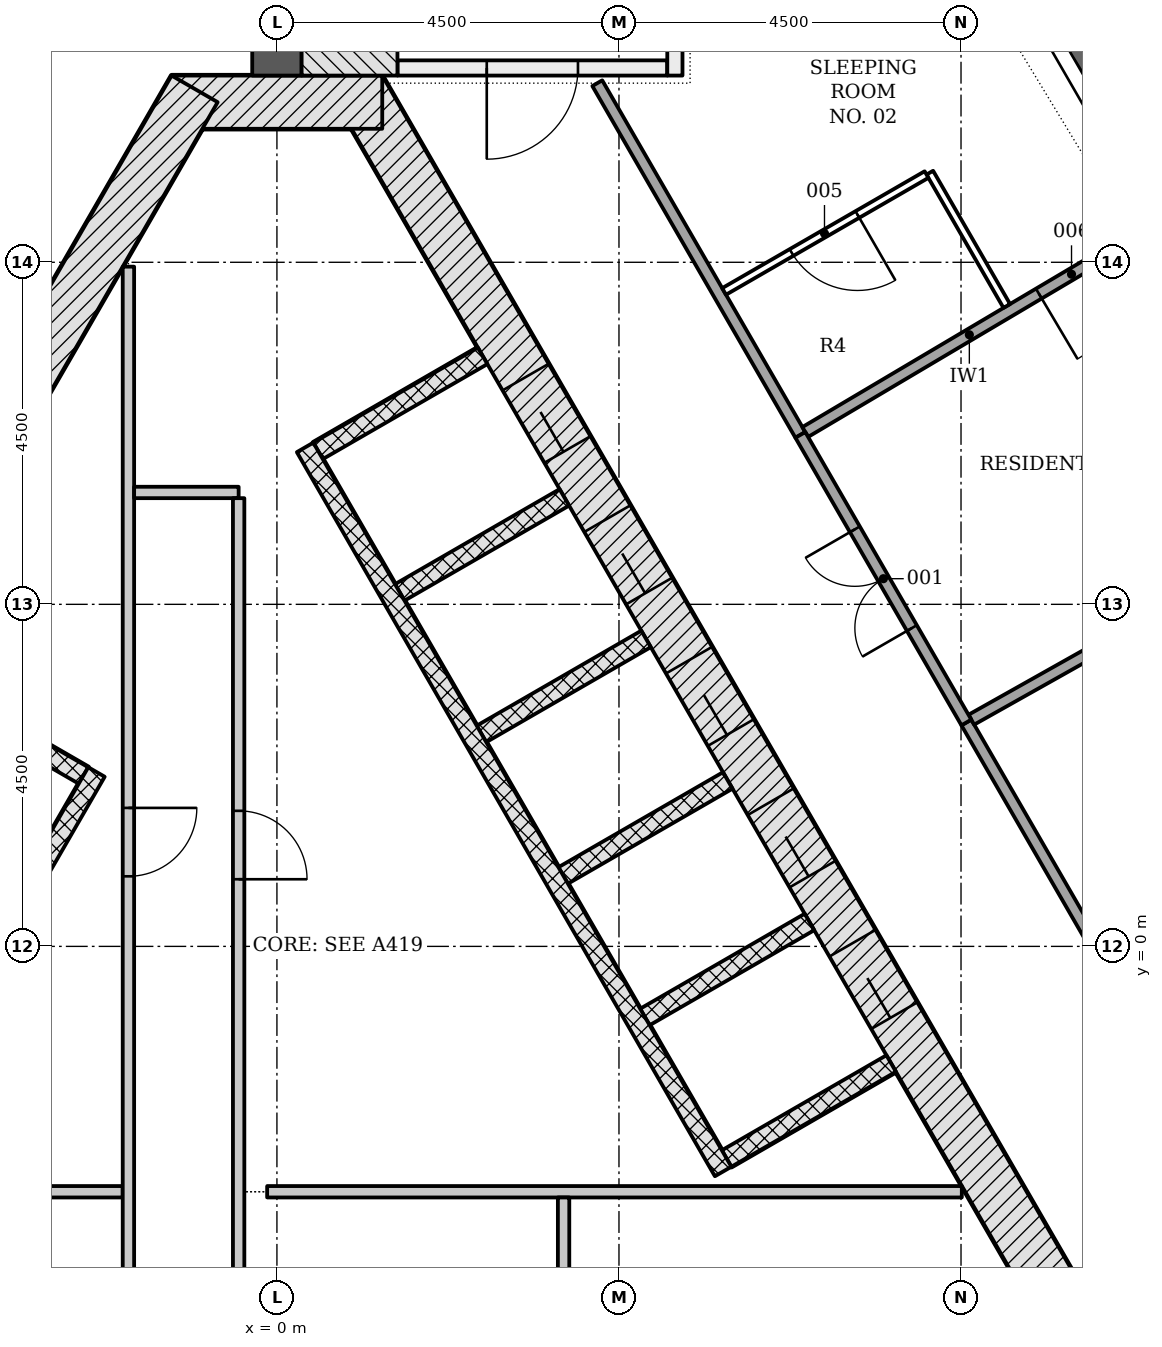
"""IFC4 building model, lengths in metres.
Left out: names, types, materials, properties, quantities, classifications, styles, units other than length and angle.
Written with IfcOpenShell. Run it as: python <this file> out.ifc"""

import sys

from ifc_helpers import new_model, si_unit, direction, frame, frame_2d, origin, place, context, subcontext, project, spatial, rectangle, extrude, element, fill, save


model = new_model("IFC4")
c1 = context("Model", 3, precision=1e-05, world=origin(), true_north=direction((0.0, 1.0)))
c2 = subcontext(c1, "Body", "Model", "MODEL_VIEW")
j1 = project(units=[si_unit("LENGTHUNIT", "METRE"), si_unit("PLANEANGLEUNIT", "RADIAN")], contexts=[c1])
p1 = place(None, origin())
s1 = spatial("IfcSite", under=j1, at=p1, CompositionType="ELEMENT")
p2 = place(p1, origin())
s2 = spatial("IfcBuilding", under=s1, at=p2, CompositionType="ELEMENT")
p3 = place(p2, frame((0.0, 0.0, 232.8)))
s3 = spatial("IfcBuildingStorey", under=s2, at=p3, CompositionType="ELEMENT", Elevation=232.8)
p4 = place(p3, frame((8.926, -6.753, -0.2), z_axis=(0.0, 0.0, 1.0), x_axis=(0.500042739161, 0.866000726912, 0.0)))
e1 = element("IfcWall", 1, at=p4, inside=s3, PredefinedType="SHEAR", context=c2, shape_type="SweptSolid", body=[
    extrude(rectangle(XDim=2.771, YDim=0.7, at=frame_2d((1.386, 0.0))), origin(), (0.0, 0.0, 1.0), 3.6),
])
p5 = place(p3, frame((10.311, -4.703, -0.2), z_axis=(0.0, 0.0, 1.0), x_axis=(-0.500001446645, 0.866024568562, 0.0)))
e2 = element("IfcWall", 2, at=p5, inside=s3, PredefinedType="SHEAR", context=c2, shape_type="SweptSolid", body=[
    extrude(rectangle(XDim=18.458, YDim=0.7, at=frame_2d((9.229, 0.0))), origin(), (0.0, 0.0, 1.0), 3.6),
])
p6 = place(p5, frame((4.379, 0.0, 0.2)))
e3 = element("IfcOpeningElement", 3, at=p6, cuts=e2, PredefinedType="OPENING", context=c2, shape_type="SweptSolid", body=[
    extrude(rectangle(XDim=1.1, YDim=2.1, at=frame_2d((0.55, 1.05))), frame((0.0, 0.36, 0.0), z_axis=(0.0, -1.0, 0.0), x_axis=(1.0, 0.0, 0.0)), (0.0, 0.0, 1.0), 0.72),
])
p7 = place(p5, frame((6.529, 0.0, 0.2)))
e4 = element("IfcOpeningElement", 4, at=p7, cuts=e2, PredefinedType="OPENING", context=c2, shape_type="SweptSolid", body=[
    extrude(rectangle(XDim=1.1, YDim=2.1, at=frame_2d((0.55, 1.05))), frame((0.0, 0.36, 0.0), z_axis=(0.0, -1.0, 0.0), x_axis=(1.0, 0.0, 0.0)), (0.0, 0.0, 1.0), 0.72),
])
p8 = place(p5, frame((8.679, 0.0, 0.2)))
e5 = element("IfcOpeningElement", 5, at=p8, cuts=e2, PredefinedType="OPENING", context=c2, shape_type="SweptSolid", body=[
    extrude(rectangle(XDim=1.1, YDim=2.1, at=frame_2d((0.55, 1.05))), frame((0.0, 0.36, 0.0), z_axis=(0.0, -1.0, 0.0), x_axis=(1.0, 0.0, 0.0)), (0.0, 0.0, 1.0), 0.72),
])
p9 = place(p5, frame((10.829, 0.0, 0.2)))
e6 = element("IfcOpeningElement", 6, at=p9, cuts=e2, PredefinedType="OPENING", context=c2, shape_type="SweptSolid", body=[
    extrude(rectangle(XDim=1.1, YDim=2.1, at=frame_2d((0.55, 1.05))), frame((0.0, 0.36, 0.0), z_axis=(0.0, -1.0, 0.0), x_axis=(1.0, 0.0, 0.0)), (0.0, 0.0, 1.0), 0.72),
])
p10 = place(p5, frame((12.979, 0.0, 0.2)))
e7 = element("IfcOpeningElement", 7, at=p10, cuts=e2, PredefinedType="OPENING", context=c2, shape_type="SweptSolid", body=[
    extrude(rectangle(XDim=1.1, YDim=2.1, at=frame_2d((0.55, 1.05))), frame((0.0, 0.36, 0.0), z_axis=(0.0, -1.0, 0.0), x_axis=(1.0, 0.0, 0.0)), (0.0, 0.0, 1.0), 0.72),
])
p11 = place(p3, frame((1.386, 11.106, -0.2), z_axis=(0.0, 0.0, 1.0), x_axis=(-1.0, 0.0, 0.0)))
e8 = element("IfcWall", 8, at=p11, inside=s3, PredefinedType="SHEAR", context=c2, shape_type="SweptSolid", body=[
    extrude(rectangle(XDim=2.771, YDim=0.7, at=frame_2d((1.386, 0.0))), origin(), (0.0, 0.0, 1.0), 3.6),
])
p12 = place(p3, frame((-1.083, 11.281, -0.2), z_axis=(0.0, 0.0, 1.0), x_axis=(-0.500001446645, -0.866024568562, 0.0)))
e9 = element("IfcWall", 9, at=p12, inside=s3, PredefinedType="SHEAR", context=c2, shape_type="SweptSolid", body=[
    extrude(rectangle(XDim=18.458, YDim=0.7, at=frame_2d((9.229, 0.0))), origin(), (0.0, 0.0, 1.0), 3.6),
])
p13 = place(p12, frame((8.979, 0.0, 0.2)))
e10 = element("IfcOpeningElement", 10, at=p13, cuts=e9, PredefinedType="OPENING", context=c2, shape_type="SweptSolid", body=[
    extrude(rectangle(XDim=1.2, YDim=2.1, at=frame_2d((0.6, 1.05))), frame((0.0, 0.36, 0.0), z_axis=(0.0, -1.0, 0.0), x_axis=(1.0, 0.0, 0.0)), (0.0, 0.0, 1.0), 0.72),
])
p14 = place(p12, frame((11.029, 0.0, 0.2)))
e11 = element("IfcOpeningElement", 11, at=p14, cuts=e9, PredefinedType="OPENING", context=c2, shape_type="SweptSolid", body=[
    extrude(rectangle(XDim=1.2, YDim=2.1, at=frame_2d((0.6, 1.05))), frame((0.0, 0.36, 0.0), z_axis=(0.0, -1.0, 0.0), x_axis=(1.0, 0.0, 0.0)), (0.0, 0.0, 1.0), 0.72),
])
p15 = place(p3, frame((0.0, 11.456, -0.2), z_axis=(0.0, 0.0, 1.0), x_axis=(0.0, 1.0, 0.0)))
e12 = element("IfcWall", 12, at=p15, inside=s3, PredefinedType="SHEAR", context=c2, shape_type="SweptSolid", body=[
    extrude(rectangle(XDim=7.507, YDim=0.65, at=frame_2d((3.753, 0.0))), origin(), (0.0, 0.0, 1.0), 3.6),
])
for number, where, z_axis, x_axis in (
    (13, (8.081, -1.541, -0.2), (0.0, 0.0, 1.0), (-0.866, -0.5, 0.0)),
    (14, (7.006, 0.321, -0.2), (0.0, 0.0, 1.0), (-0.866, -0.5, 0.0)),
):
    element("IfcWall", number, at=place(p3, frame(where, z_axis=z_axis, x_axis=x_axis)), inside=s3, PredefinedType="PARTITIONING", context=c2, shape_type="SweptSolid", body=[
        extrude(rectangle(XDim=2.5, YDim=0.25, at=frame_2d((1.25, 0.0))), origin(), (0.0, 0.0, 1.0), 3.6),
    ])
p16 = place(p3, frame((5.931, 2.183, -0.2), z_axis=(0.0, 0.0, 1.0), x_axis=(-0.866047370643, -0.499961950354, 0.0)))
e15 = element("IfcWall", 15, at=p16, inside=s3, PredefinedType="PARTITIONING", context=c2, shape_type="SweptSolid", body=[
    extrude(rectangle(XDim=2.5, YDim=0.25, at=frame_2d((1.25, 0.0))), origin(), (0.0, 0.0, 1.0), 3.6),
])
for number, where, z_axis, x_axis in (
    (16, (4.856, 4.045, -0.2), (0.0, 0.0, 1.0), (-0.866, -0.5, 0.0)),
    (17, (3.781, 5.907, -0.2), (0.0, 0.0, 1.0), (-0.866, -0.5, 0.0)),
    (18, (2.706, 7.769, -0.2), (0.0, 0.0, 1.0), (-0.866, -0.5, 0.0)),
):
    element("IfcWall", number, at=place(p3, frame(where, z_axis=z_axis, x_axis=x_axis)), inside=s3, PredefinedType="PARTITIONING", context=c2, shape_type="SweptSolid", body=[
        extrude(rectangle(XDim=2.5, YDim=0.25, at=frame_2d((1.25, 0.0))), origin(), (0.0, 0.0, 1.0), 3.6),
    ])
p17 = place(p3, frame((5.87, -2.961, 0.0), z_axis=(0.0, 0.0, 1.0), x_axis=(-0.50000615651, 0.866021849293, 0.0)))
e19 = element("IfcWall", 19, at=p17, inside=s3, PredefinedType="PARTITIONING", context=c2, shape_type="SweptSolid", body=[
    extrude(rectangle(XDim=11.0, YDim=0.25, at=frame_2d((5.5, 0.0))), origin(), (0.0, 0.0, 1.0), 3.4),
])
p18 = place(p3, frame((-5.056, 3.699, -0.2), z_axis=(0.0, 0.0, 1.0), x_axis=(0.866032775405, -0.499987231761, 0.0)))
e20 = element("IfcWall", 20, at=p18, inside=s3, PredefinedType="PARTITIONING", context=c2, shape_type="SweptSolid", body=[
    extrude(rectangle(XDim=2.9, YDim=0.25, at=frame_2d((1.45, 0.0))), origin(), (0.0, 0.0, 1.0), 3.6),
])
p19 = place(p3, frame((-2.374, 2.294, 0.0), z_axis=(0.0, 0.0, 1.0), x_axis=(-0.500003174267, -0.866023571113, 0.0)))
e21 = element("IfcWall", 21, at=p19, inside=s3, PredefinedType="PARTITIONING", context=c2, shape_type="SweptSolid", body=[
    extrude(rectangle(XDim=6.7, YDim=0.25, at=frame_2d((3.35, 0.0))), origin(), (0.0, 0.0, 1.0), 3.4),
])
p20 = place(p3, frame((-5.373, -3.228, 0.0), z_axis=(0.0, 0.0, 1.0), x_axis=(1.0, 0.0, 0.0)))
e22 = element("IfcWall", 22, at=p20, inside=s3, PredefinedType="PARTITIONING", context=c2, shape_type="SweptSolid", body=[
    extrude(rectangle(XDim=3.344, YDim=0.15, at=frame_2d((1.672, 0.0))), origin(), (0.0, 0.0, 1.0), 3.4),
])
p21 = place(p3, frame((-1.954, 8.942, 0.0), z_axis=(0.0, 0.0, 1.0), x_axis=(0.0, -1.0, 0.0)))
e23 = element("IfcWall", 23, at=p21, inside=s3, PredefinedType="PARTITIONING", context=c2, shape_type="SweptSolid", body=[
    extrude(rectangle(XDim=15.171, YDim=0.15, at=frame_2d((7.585, 0.0))), origin(), (0.0, 0.0, 1.0), 3.4),
])
p22 = place(p21, frame((7.121, 0.0, 0.0)))
e24 = element("IfcOpeningElement", 24, at=p22, cuts=e23, PredefinedType="OPENING", context=c2, shape_type="SweptSolid", body=[
    extrude(rectangle(XDim=0.9, YDim=2.1, at=frame_2d((0.45, 1.05))), frame((0.0, 0.085, 0.0), z_axis=(0.0, -1.0, 0.0), x_axis=(1.0, 0.0, 0.0)), (0.0, 0.0, 1.0), 0.17),
])
p23 = place(p3, frame((-1.879, 5.972, 0.0), z_axis=(0.0, 0.0, 1.0), x_axis=(1.0, 0.0, 0.0)))
e25 = element("IfcWall", 25, at=p23, inside=s3, PredefinedType="PARTITIONING", context=c2, shape_type="SweptSolid", body=[
    extrude(rectangle(XDim=1.375, YDim=0.15, at=frame_2d((0.688, 0.0))), origin(), (0.0, 0.0, 1.0), 3.4),
])
p24 = place(p3, frame((-0.504, 5.897, 0.0), z_axis=(0.0, 0.0, 1.0), x_axis=(0.0, -1.0, 0.0)))
e26 = element("IfcWall", 26, at=p24, inside=s3, PredefinedType="PARTITIONING", context=c2, shape_type="SweptSolid", body=[
    extrude(rectangle(XDim=12.125, YDim=0.15, at=frame_2d((6.062, 0.0))), origin(), (0.0, 0.0, 1.0), 3.4),
])
p25 = place(p24, frame((4.114, 0.0, 0.0)))
e27 = element("IfcOpeningElement", 27, at=p25, cuts=e26, PredefinedType="OPENING", context=c2, shape_type="SweptSolid", body=[
    extrude(rectangle(XDim=0.9, YDim=2.1, at=frame_2d((0.45, 1.05))), frame((0.0, 0.085, 0.0), z_axis=(0.0, -1.0, 0.0), x_axis=(1.0, 0.0, 0.0)), (0.0, 0.0, 1.0), 0.17),
])
p26 = place(p3, frame((-0.129, -3.228, 0.0), z_axis=(0.0, 0.0, 1.0), x_axis=(1.0, 0.0, 0.0)))
e28 = element("IfcWall", 28, at=p26, inside=s3, PredefinedType="PARTITIONING", context=c2, shape_type="SweptSolid", body=[
    extrude(rectangle(XDim=9.139, YDim=0.15, at=frame_2d((4.57, 0.0))), origin(), (0.0, 0.0, 1.0), 3.4),
])
p27 = place(p3, frame((3.771, -3.303, 0.0), z_axis=(0.0, 0.0, 1.0), x_axis=(0.0, -1.0, 0.0)))
e29 = element("IfcWall", 29, at=p27, inside=s3, PredefinedType="PARTITIONING", context=c2, shape_type="SweptSolid", body=[
    extrude(rectangle(XDim=2.925, YDim=0.15, at=frame_2d((1.462, 0.0))), origin(), (0.0, 0.0, 1.0), 3.4),
])
p28 = place(p3, frame((5.135, 11.556, -0.2), z_axis=(0.0, 0.0, 1.0), x_axis=(-1.0, 0.0, 0.0)))
e30 = element("IfcWall", 30, at=p28, inside=s3, PredefinedType="SHEAR", context=c2, shape_type="SweptSolid", body=[
    extrude(rectangle(XDim=3.55, YDim=0.2, at=frame_2d((1.775, 0.0))), origin(), (0.0, 0.0, 1.0), 3.6),
])
p29 = place(p28, frame((1.175, 0.0, 0.2)))
e31 = element("IfcOpeningElement", 31, at=p29, cuts=e30, PredefinedType="OPENING", context=c2, shape_type="SweptSolid", body=[
    extrude(rectangle(XDim=1.2, YDim=2.1, at=frame_2d((0.6, 1.05))), frame((0.0, 0.11, 0.0), z_axis=(0.0, -1.0, 0.0), x_axis=(1.0, 0.0, 0.0)), (0.0, 0.0, 1.0), 0.22),
])
p30 = place(p3, frame((5.236, 11.456, -0.2), z_axis=(0.0, 0.0, 1.0), x_axis=(0.0, 1.0, 0.0)))
e32 = element("IfcWall", 32, at=p30, inside=s3, PredefinedType="SHEAR", context=c2, shape_type="SweptSolid", body=[
    extrude(rectangle(XDim=5.6, YDim=0.2, at=frame_2d((2.8, 0.0))), origin(), (0.0, 0.0, 1.0), 3.6),
])
p31 = place(p30, frame((0.45, 0.0, 0.2)))
e33 = element("IfcOpeningElement", 33, at=p31, cuts=e32, PredefinedType="OPENING", context=c2, shape_type="SweptSolid", body=[
    extrude(rectangle(XDim=1.2, YDim=2.1, at=frame_2d((0.6, 1.05))), frame((0.0, 0.11, 0.0), z_axis=(0.0, -1.0, 0.0), x_axis=(1.0, 0.0, 0.0)), (0.0, 0.0, 1.0), 0.22),
])
p32 = place(p3, frame((0.955, 11.456, -0.2), z_axis=(0.0, 0.0, 1.0), x_axis=(0.0, 1.0, 0.0)))
e34 = element("IfcWall", 34, at=p32, inside=s3, PredefinedType="SHEAR", context=c2, shape_type="SweptSolid", body=[
    extrude(rectangle(XDim=7.507, YDim=1.261, at=frame_2d((3.753, 0.0))), origin(), (0.0, 0.0, 1.0), 3.6),
])
p33 = place(p3, frame((15.832, -8.765, 0.0), z_axis=(0.0, 0.0, 1.0), x_axis=(-0.500008967739, 0.866020226196, 0.0)))
e35 = element("IfcWall", 35, at=p33, inside=s3, PredefinedType="PARTITIONING", context=c2, shape_type="SweptSolid", body=[
    extrude(rectangle(XDim=13.523, YDim=0.15, at=frame_2d((6.761, 0.0))), origin(), (0.0, 0.0, 1.0), 2.852),
])
p34 = place(p3, frame((6.886, 6.729, 0.0), z_axis=(0.0, 0.0, 1.0), x_axis=(-0.4999966759, 0.866027322946, 0.0)))
e36 = element("IfcWall", 36, at=p34, inside=s3, PredefinedType="PARTITIONING", context=c2, shape_type="SweptSolid", body=[
    extrude(rectangle(XDim=5.343, YDim=0.15, at=frame_2d((2.672, 0.0))), origin(), (0.0, 0.0, 1.0), 2.852),
])
p35 = place(p3, frame((13.514, 5.444, 0.0), z_axis=(0.0, 0.0, 1.0), x_axis=(-0.871644326388, -0.490138927525, 0.0)))
e37 = element("IfcWall", 37, at=p35, inside=s3, PredefinedType="PARTITIONING", context=c2, shape_type="SweptSolid", body=[
    extrude(rectangle(XDim=5.023, YDim=0.15, at=frame_2d((2.511, 0.0))), origin(), (0.0, 0.0, 1.0), 3.4),
])
p36 = place(p35, frame((2.049, 0.0, 0.0)))
e38 = element("IfcOpeningElement", 38, at=p36, cuts=e37, PredefinedType="OPENING", context=c2, shape_type="SweptSolid", body=[
    extrude(rectangle(XDim=1.0, YDim=2.1, at=frame_2d((0.5, 1.05))), frame((0.0, 0.085, 0.0), z_axis=(0.0, -1.0, 0.0), x_axis=(1.0, 0.0, 0.0)), (0.0, 0.0, 1.0), 0.17),
])
p37 = place(p3, frame((11.268, 9.325, 0.0), z_axis=(0.0, 0.0, 1.0), x_axis=(-0.860287582295, -0.509809058128, 0.0)))
e39 = element("IfcWall", 39, at=p37, inside=s3, PredefinedType="PARTITIONING", context=c2, shape_type="SweptSolid", body=[
    extrude(rectangle(XDim=5.018, YDim=0.15, at=frame_2d((2.509, 0.0))), origin(), (0.0, 0.0, 1.0), 3.4),
])
p38 = place(p37, frame((0.447, 0.0, 0.0)))
e40 = element("IfcOpeningElement", 40, at=p38, cuts=e39, PredefinedType="OPENING", context=c2, shape_type="SweptSolid", body=[
    extrude(rectangle(XDim=1.0, YDim=2.1, at=frame_2d((0.5, 1.05))), frame((0.0, 0.085, 0.0), z_axis=(0.0, -1.0, 0.0), x_axis=(1.0, 0.0, 0.0)), (0.0, 0.0, 1.0), 0.17),
])
p39 = place(p3, frame((9.071, 2.946, 0.0), z_axis=(0.0, 0.0, 1.0), x_axis=(-0.499991738058, 0.866030173766, 0.0)))
e41 = element("IfcWall", 41, at=p39, inside=s3, PredefinedType="PARTITIONING", context=c2, shape_type="SweptSolid", body=[
    extrude(rectangle(XDim=4.369, YDim=0.15, at=frame_2d((2.184, 0.0))), origin(), (0.0, 0.0, 1.0), 2.852),
])
p40 = place(p39, frame((1.434, 0.0, 0.0)))
e42 = element("IfcOpeningElement", 42, at=p40, cuts=e41, PredefinedType="OPENING", context=c2, shape_type="SweptSolid", body=[
    extrude(rectangle(XDim=1.5, YDim=2.1, at=frame_2d((0.75, 1.05))), frame((0.0, 0.085, 0.0), z_axis=(0.0, -1.0, 0.0), x_axis=(1.0, 0.0, 0.0)), (0.0, 0.0, 1.0), 0.17),
])
p41 = place(p3, frame((9.602, 8.425, 0.0), z_axis=(0.0, 0.0, 1.0), x_axis=(-0.500080744026, 0.86597878118, 0.0)))
e43 = element("IfcWall", 43, at=p41, inside=s3, PredefinedType="PARTITIONING", context=c2, shape_type="SweptSolid", body=[
    extrude(rectangle(XDim=2.025, YDim=0.1, at=frame_2d((1.013, 0.0))), origin(), (0.0, 0.0, 1.0), 3.4),
])
p42 = place(p3, frame((8.546, 10.154, 0.0), z_axis=(0.0, 0.0, 1.0), x_axis=(-0.866016353143, -0.500015675843, 0.0)))
e44 = element("IfcWall", 44, at=p42, inside=s3, PredefinedType="PARTITIONING", context=c2, shape_type="SweptSolid", body=[
    extrude(rectangle(XDim=3.075, YDim=0.1, at=frame_2d((1.538, 0.0))), origin(), (0.0, 0.0, 1.0), 3.4),
])
p43 = place(p42, frame((1.05, 0.0, 0.0)))
e45 = element("IfcOpeningElement", 45, at=p43, cuts=e44, PredefinedType="OPENING", context=c2, shape_type="SweptSolid", body=[
    extrude(rectangle(XDim=1.0, YDim=2.1, at=frame_2d((0.5, 1.05))), frame((0.0, 0.06, 0.0), z_axis=(0.0, -1.0, 0.0), x_axis=(1.0, 0.0, 0.0)), (0.0, 0.0, 1.0), 0.12),
])
p44 = place(p3, frame((-0.545, 18.513, 0.0), z_axis=(0.0, 0.0, 1.0), x_axis=(-0.499998165157, -0.866026463129, 0.0)))
e46 = element("IfcWall", 46, at=p44, inside=s3, PredefinedType="PARTITIONING", context=c2, shape_type="SweptSolid", body=[
    extrude(rectangle(XDim=13.771, YDim=0.15, at=frame_2d((6.886, 0.0))), origin(), (0.0, 0.0, 1.0), 2.852),
])
p45 = place(p6, origin())
e47 = element("IfcDoor", 47, at=p45, inside=s3, OperationType="DOUBLE_DOOR_SLIDING", PredefinedType="DOOR", context=c2, shape_type="SweptSolid", body=[
    extrude(rectangle(XDim=1.1, YDim=2.1, at=frame_2d((0.55, 1.05))), frame((0.0, 0.025, 0.0), z_axis=(0.0, -1.0, 0.0), x_axis=(1.0, 0.0, 0.0)), (0.0, 0.0, 1.0), 0.05),
])
fill(e3, e47)
p46 = place(p7, origin())
e48 = element("IfcDoor", 48, at=p46, inside=s3, OperationType="DOUBLE_DOOR_SLIDING", PredefinedType="DOOR", context=c2, shape_type="SweptSolid", body=[
    extrude(rectangle(XDim=1.1, YDim=2.1, at=frame_2d((0.55, 1.05))), frame((0.0, 0.025, 0.0), z_axis=(0.0, -1.0, 0.0), x_axis=(1.0, 0.0, 0.0)), (0.0, 0.0, 1.0), 0.05),
])
fill(e4, e48)
p47 = place(p8, origin())
e49 = element("IfcDoor", 49, at=p47, inside=s3, OperationType="DOUBLE_DOOR_SLIDING", PredefinedType="DOOR", context=c2, shape_type="SweptSolid", body=[
    extrude(rectangle(XDim=1.1, YDim=2.1, at=frame_2d((0.55, 1.05))), frame((0.0, 0.025, 0.0), z_axis=(0.0, -1.0, 0.0), x_axis=(1.0, 0.0, 0.0)), (0.0, 0.0, 1.0), 0.05),
])
fill(e5, e49)
p48 = place(p9, origin())
e50 = element("IfcDoor", 50, at=p48, inside=s3, OperationType="DOUBLE_DOOR_SLIDING", PredefinedType="DOOR", context=c2, shape_type="SweptSolid", body=[
    extrude(rectangle(XDim=1.1, YDim=2.1, at=frame_2d((0.55, 1.05))), frame((0.0, 0.025, 0.0), z_axis=(0.0, -1.0, 0.0), x_axis=(1.0, 0.0, 0.0)), (0.0, 0.0, 1.0), 0.05),
])
fill(e6, e50)
p49 = place(p10, origin())
e51 = element("IfcDoor", 51, at=p49, inside=s3, OperationType="DOUBLE_DOOR_SLIDING", PredefinedType="DOOR", context=c2, shape_type="SweptSolid", body=[
    extrude(rectangle(XDim=1.1, YDim=2.1, at=frame_2d((0.55, 1.05))), frame((0.0, 0.025, 0.0), z_axis=(0.0, -1.0, 0.0), x_axis=(1.0, 0.0, 0.0)), (0.0, 0.0, 1.0), 0.05),
])
fill(e7, e51)
p50 = place(p22, origin())
e52 = element("IfcDoor", 52, at=p50, inside=s3, OperationType="SINGLE_SWING_LEFT", PredefinedType="DOOR", context=c2, shape_type="SweptSolid", body=[
    extrude(rectangle(XDim=0.9, YDim=2.1, at=frame_2d((0.45, 1.05))), frame((0.0, 0.025, 0.0), z_axis=(0.0, -1.0, 0.0), x_axis=(1.0, 0.0, 0.0)), (0.0, 0.0, 1.0), 0.05),
])
fill(e24, e52)
p51 = place(p25, origin())
e53 = element("IfcDoor", 53, at=p51, inside=s3, OperationType="SINGLE_SWING_RIGHT", PredefinedType="DOOR", context=c2, shape_type="SweptSolid", body=[
    extrude(rectangle(XDim=0.9, YDim=2.1, at=frame_2d((0.45, 1.05))), frame((0.0, 0.025, 0.0), z_axis=(0.0, -1.0, 0.0), x_axis=(1.0, 0.0, 0.0)), (0.0, 0.0, 1.0), 0.05),
])
fill(e27, e53)
p52 = place(p29, origin())
e54 = element("IfcDoor", 54, at=p52, inside=s3, OperationType="SINGLE_SWING_RIGHT", PredefinedType="DOOR", context=c2, shape_type="SweptSolid", body=[
    extrude(rectangle(XDim=1.2, YDim=2.1, at=frame_2d((0.6, 1.05))), frame((0.0, 0.025, 0.0), z_axis=(0.0, -1.0, 0.0), x_axis=(1.0, 0.0, 0.0)), (0.0, 0.0, 1.0), 0.05),
])
fill(e31, e54)
p53 = place(p40, origin())
e55 = element("IfcDoor", 55, at=p53, inside=s3, OperationType="DOUBLE_DOOR_SINGLE_SWING", PredefinedType="DOOR", context=c2, shape_type="SweptSolid", body=[
    extrude(rectangle(XDim=1.5, YDim=2.1, at=frame_2d((0.75, 1.05))), frame((0.0, 0.025, 0.0), z_axis=(0.0, -1.0, 0.0), x_axis=(1.0, 0.0, 0.0)), (0.0, 0.0, 1.0), 0.05),
])
fill(e42, e55)
p54 = place(p43, origin())
e56 = element("IfcDoor", 56, at=p54, inside=s3, OperationType="SINGLE_SWING_LEFT", PredefinedType="DOOR", context=c2, shape_type="SweptSolid", body=[
    extrude(rectangle(XDim=1.0, YDim=2.1, at=frame_2d((0.5, 1.05))), frame((0.0, 0.025, 0.0), z_axis=(0.0, -1.0, 0.0), x_axis=(1.0, 0.0, 0.0)), (0.0, 0.0, 1.0), 0.05),
])
fill(e45, e56)
p55 = place(p38, origin())
e57 = element("IfcDoor", 57, at=p55, inside=s3, OperationType="SINGLE_SWING_RIGHT", PredefinedType="DOOR", context=c2, shape_type="SweptSolid", body=[
    extrude(rectangle(XDim=1.0, YDim=2.1, at=frame_2d((0.5, 1.05))), frame((0.0, 0.025, 0.0), z_axis=(0.0, -1.0, 0.0), x_axis=(1.0, 0.0, 0.0)), (0.0, 0.0, 1.0), 0.05),
])
fill(e40, e57)
save(model, sys.argv[1])
